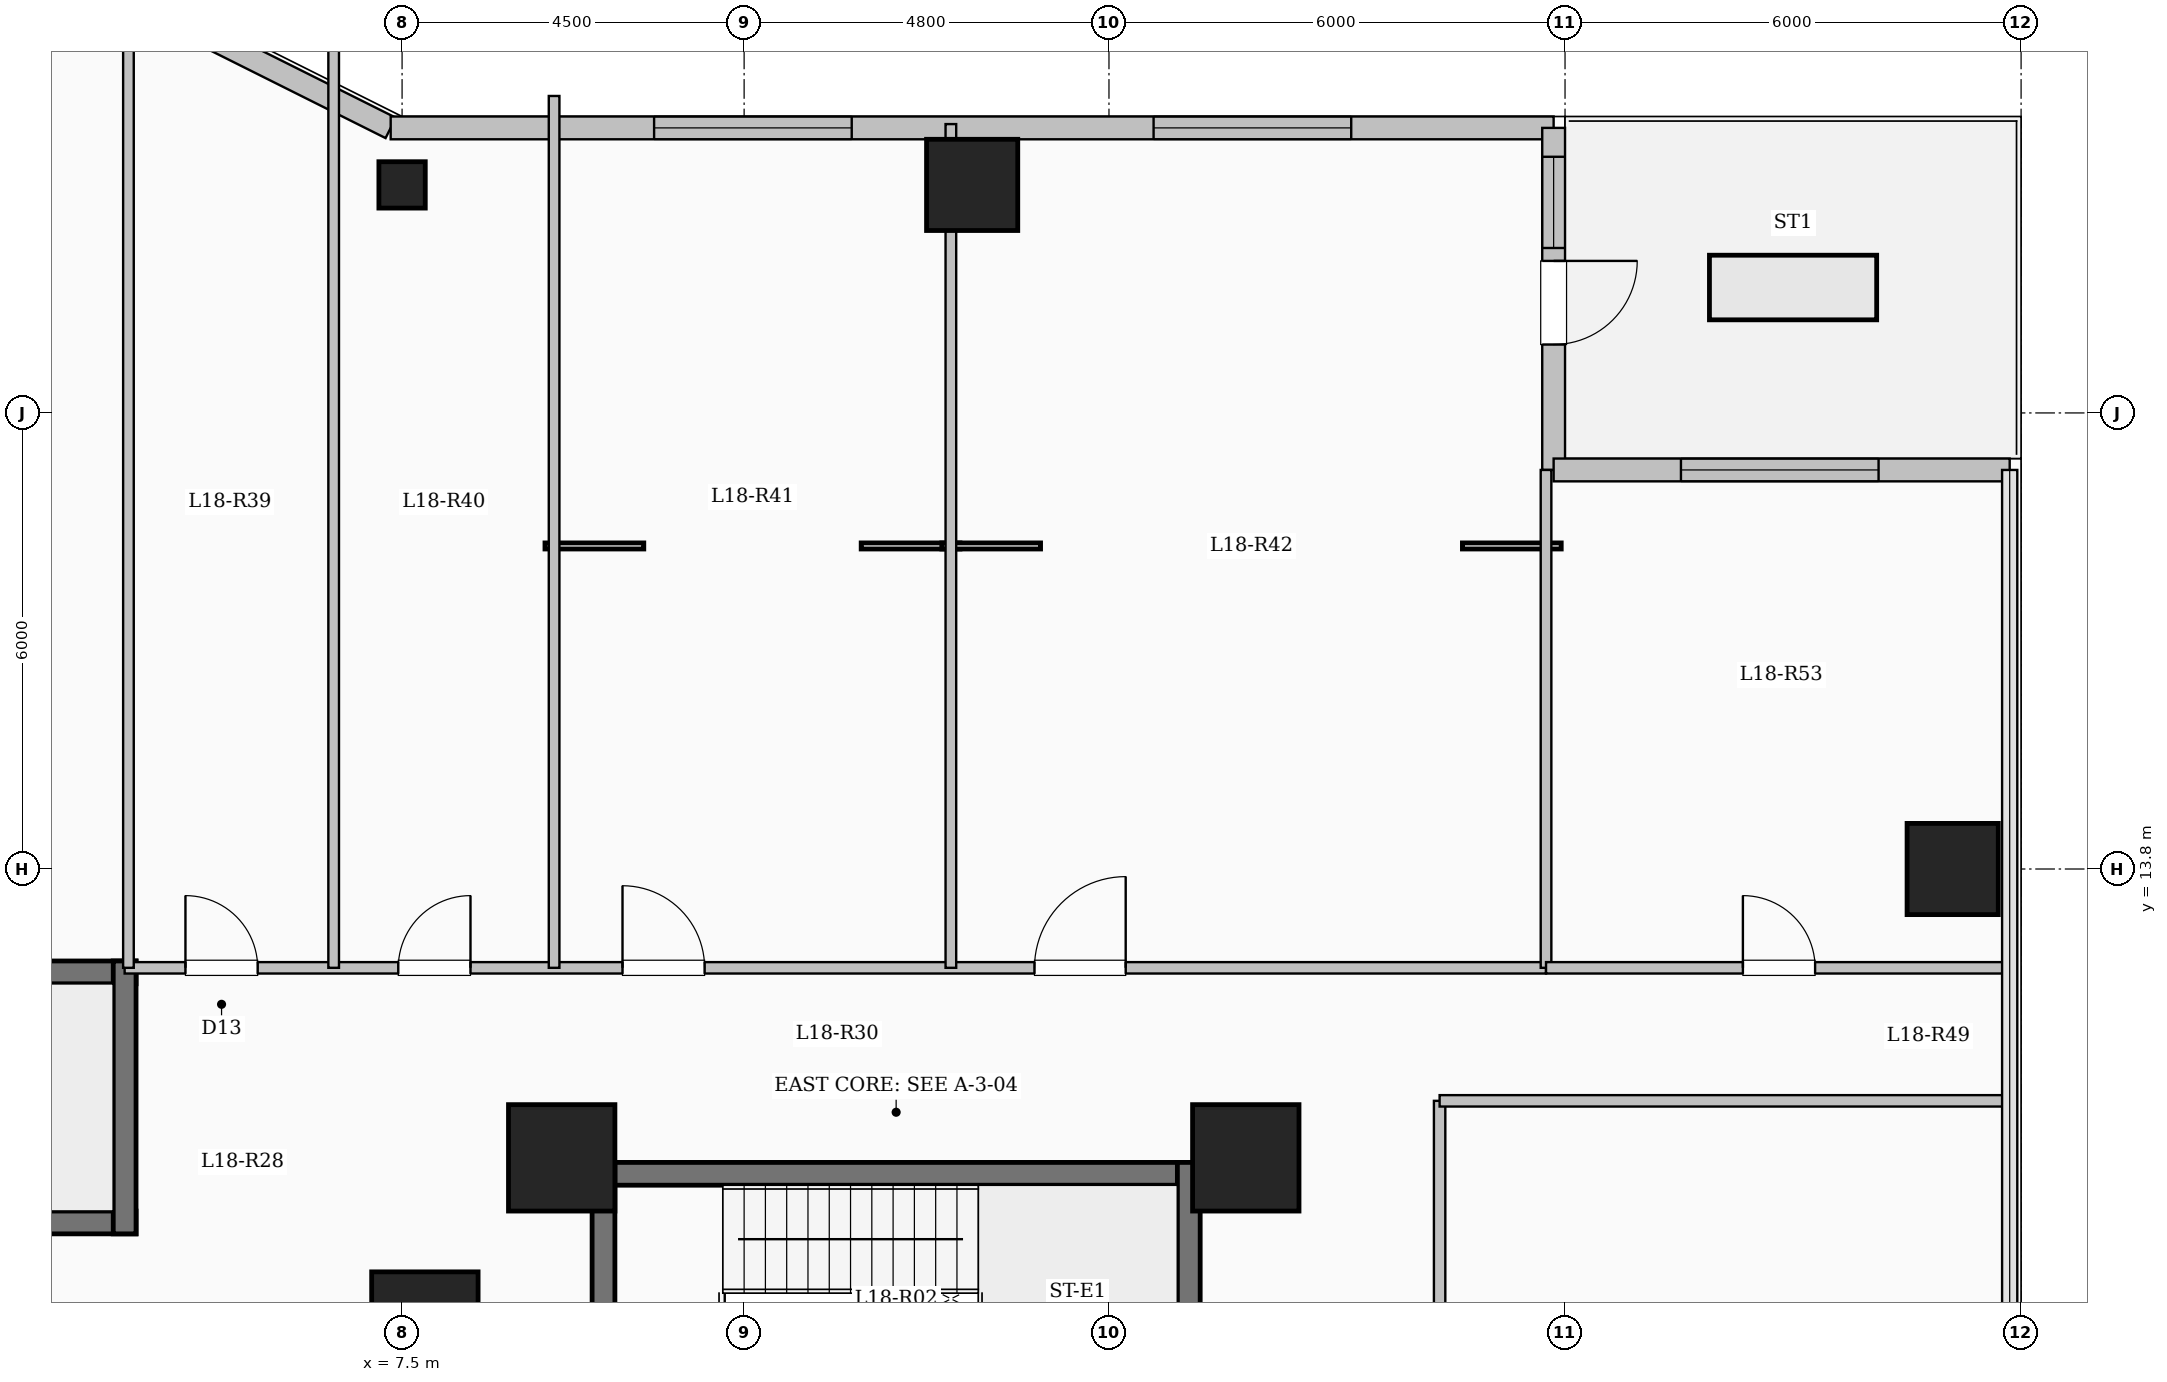
"""IFC4 building model, lengths in metres.
Left out: names, types, materials, properties, quantities, classifications, styles, units other than length and angle.
Written with IfcOpenShell. Run it as: python <this file> out.ifc"""

import sys

from ifc_helpers import new_model, si_unit, direction, frame, frame_2d, origin, origin_2d, place, context, subcontext, project, spatial, rectangle, hollow_circle, extrude, element, fill, save


model = new_model("IFC4")
c1 = context("Model", 3, precision=1e-05, world=origin(), true_north=direction((0.0, 1.0)))
c2 = subcontext(c1, "Body", "Model", "MODEL_VIEW")
j1 = project(units=[si_unit("LENGTHUNIT", "METRE"), si_unit("PLANEANGLEUNIT", "RADIAN")], contexts=[c1])
p1 = place(None, origin())
s1 = spatial("IfcSite", under=j1, at=p1, CompositionType="ELEMENT")
p2 = place(p1, origin())
s2 = spatial("IfcBuilding", under=s1, at=p2, CompositionType="ELEMENT")
p3 = place(p2, frame((0.0, 0.0, 68.7)))
s3 = spatial("IfcBuildingStorey", under=s2, at=p3, CompositionType="ELEMENT", Elevation=68.7)
for number, where, z_axis, x_axis in (
    (1, (7.8, 7.8, 0.0), (0.0, 0.0, 1.0), (1.0, 0.0, 0.0)),
    (2, (9.6, 10.0, 0.0), (0.0, 0.0, 1.0), (1.0, 0.0, 0.0)),
    (3, (18.6, 10.0, 0.0), (0.0, 0.0, 1.0), (1.0, 0.0, 0.0)),
):
    element("IfcColumn", number, at=place(p3, frame(where, z_axis=z_axis, x_axis=x_axis)), inside=s3, PredefinedType="COLUMN", context=c2, shape_type="SweptSolid", body=[
        extrude(rectangle(XDim=1.4, YDim=1.4, at=origin_2d()), origin(), (0.0, 0.0, 1.0), 4.5),
    ])
p4 = place(p3, frame((7.5, 22.8, 0.0), z_axis=(0.0, 0.0, 1.0), x_axis=(1.0, 0.0, 0.0)))
e4 = element("IfcColumn", 4, at=p4, inside=s3, PredefinedType="COLUMN", context=c2, shape_type="SweptSolid", body=[
    extrude(hollow_circle(Radius=0.305, WallThickness=0.025, at=origin_2d()), origin(), (0.0, 0.0, 1.0), 4.5),
])
for number, where, z_axis, x_axis in (
    (5, (15.0, 22.8, 0.0), (0.0, 0.0, 1.0), (1.0, 0.0, 0.0)),
    (6, (27.9, 13.8, 0.0), (0.0, 0.0, 1.0), (1.0, 0.0, 0.0)),
):
    element("IfcColumn", number, at=place(p3, frame(where, z_axis=z_axis, x_axis=x_axis)), inside=s3, PredefinedType="COLUMN", context=c2, shape_type="SweptSolid", body=[
        extrude(rectangle(XDim=1.2, YDim=1.2, at=origin_2d()), origin(), (0.0, 0.0, 1.0), 4.5),
    ])
p5 = place(p3, frame((4.35, 25.05, 0.0), z_axis=(0.0, 0.0, 1.0), x_axis=(0.894427191, -0.4472135955, 0.0)))
e7 = element("IfcWall", 7, at=p5, inside=s3, PredefinedType="SOLIDWALL", context=c2, shape_type="SweptSolid", body=[
    extrude(rectangle(XDim=3.354, YDim=0.3, at=frame_2d((1.677, 0.0))), origin(), (0.0, 0.0, 1.0), 4.2),
])
p6 = place(p3, frame((7.35, 23.55, 0.0), z_axis=(0.0, 0.0, 1.0), x_axis=(1.0, 0.0, 0.0)))
e8 = element("IfcWall", 8, at=p6, inside=s3, PredefinedType="SOLIDWALL", context=c2, shape_type="SweptSolid", body=[
    extrude(rectangle(XDim=15.3, YDim=0.3, at=frame_2d((7.65, 0.0))), origin(), (0.0, 0.0, 1.0), 4.2),
])
p7 = place(p6, frame((3.466, 0.0, 0.85)))
e9 = element("IfcOpeningElement", 9, at=p7, cuts=e8, PredefinedType="OPENING", context=c2, shape_type="SweptSolid", body=[
    extrude(rectangle(XDim=2.6, YDim=2.4, at=frame_2d((1.3, 1.2))), frame((0.0, 0.16, 0.0), z_axis=(0.0, -1.0, 0.0), x_axis=(1.0, 0.0, 0.0)), (0.0, 0.0, 1.0), 0.32),
])
p8 = place(p6, frame((10.037, 0.0, 0.85)))
e10 = element("IfcOpeningElement", 10, at=p8, cuts=e8, PredefinedType="OPENING", context=c2, shape_type="SweptSolid", body=[
    extrude(rectangle(XDim=2.6, YDim=2.4, at=frame_2d((1.3, 1.2))), frame((0.0, 0.16, 0.0), z_axis=(0.0, -1.0, 0.0), x_axis=(1.0, 0.0, 0.0)), (0.0, 0.0, 1.0), 0.32),
])
p9 = place(p3, frame((22.65, 23.55, 0.0), z_axis=(0.0, 0.0, 1.0), x_axis=(0.0, -1.0, 0.0)))
e11 = element("IfcWall", 11, at=p9, inside=s3, PredefinedType="SOLIDWALL", context=c2, shape_type="SweptSolid", body=[
    extrude(rectangle(XDim=4.5, YDim=0.3, at=frame_2d((2.25, 0.0))), origin(), (0.0, 0.0, 1.0), 4.2),
])
p10 = place(p9, frame((1.75, 0.0, 0.0)))
e12 = element("IfcOpeningElement", 12, at=p10, cuts=e11, PredefinedType="OPENING", context=c2, shape_type="SweptSolid", body=[
    extrude(rectangle(XDim=1.1, YDim=2.2, at=frame_2d((0.55, 1.1))), frame((0.0, 0.16, 0.0), z_axis=(0.0, -1.0, 0.0), x_axis=(1.0, 0.0, 0.0)), (0.0, 0.0, 1.0), 0.32),
])
p11 = place(p9, frame((0.38, 0.0, 0.95)))
e13 = element("IfcOpeningElement", 13, at=p11, cuts=e11, PredefinedType="OPENING", context=c2, shape_type="SweptSolid", body=[
    extrude(rectangle(XDim=1.2, YDim=1.5, at=frame_2d((0.6, 0.75))), frame((0.0, 0.16, 0.0), z_axis=(0.0, -1.0, 0.0), x_axis=(1.0, 0.0, 0.0)), (0.0, 0.0, 1.0), 0.32),
])
p12 = place(p3, frame((22.65, 19.05, 0.0), z_axis=(0.0, 0.0, 1.0), x_axis=(1.0, 0.0, 0.0)))
e14 = element("IfcWall", 14, at=p12, inside=s3, PredefinedType="SOLIDWALL", context=c2, shape_type="SweptSolid", body=[
    extrude(rectangle(XDim=6.0, YDim=0.3, at=frame_2d((3.0, 0.0))), origin(), (0.0, 0.0, 1.0), 4.2),
])
p13 = place(p12, frame((1.675, 0.0, 0.85)))
e15 = element("IfcOpeningElement", 15, at=p13, cuts=e14, PredefinedType="OPENING", context=c2, shape_type="SweptSolid", body=[
    extrude(rectangle(XDim=2.6, YDim=2.4, at=frame_2d((1.3, 1.2))), frame((0.0, 0.16, 0.0), z_axis=(0.0, -1.0, 0.0), x_axis=(1.0, 0.0, 0.0)), (0.0, 0.0, 1.0), 0.32),
])
p14 = place(p3, frame((10.0, 9.79, 0.0), z_axis=(0.0, 0.0, 1.0), x_axis=(1.0, 0.0, 0.0)))
e16 = element("IfcWall", 16, at=p14, inside=s3, PredefinedType="SHEAR", context=c2, shape_type="SweptSolid", body=[
    extrude(rectangle(XDim=8.0, YDim=0.3, at=frame_2d((4.0, 0.0))), origin(), (0.0, 0.0, 1.0), 4.5),
])
for number, where, z_axis, x_axis in (
    (17, (10.15, 6.35, 0.0), (0.0, 0.0, 1.0), (0.0, 1.0, 0.0)),
    (18, (17.85, 6.35, 0.0), (0.0, 0.0, 1.0), (0.0, 1.0, 0.0)),
):
    element("IfcWall", number, at=place(p3, frame(where, z_axis=z_axis, x_axis=x_axis)), inside=s3, PredefinedType="SHEAR", context=c2, shape_type="SweptSolid", body=[
        extrude(rectangle(XDim=3.59, YDim=0.3, at=frame_2d((1.795, 0.0))), origin(), (0.0, 0.0, 1.0), 4.5),
    ])
p15 = place(p3, frame((-4.0, 12.44, 0.0), z_axis=(0.0, 0.0, 1.0), x_axis=(1.0, 0.0, 0.0)))
e19 = element("IfcWall", 19, at=p15, inside=s3, PredefinedType="SHEAR", context=c2, shape_type="SweptSolid", body=[
    extrude(rectangle(XDim=8.0, YDim=0.3, at=frame_2d((4.0, 0.0))), origin(), (0.0, 0.0, 1.0), 4.5),
])
p16 = place(p3, frame((-4.0, 9.15, 0.0), z_axis=(0.0, 0.0, 1.0), x_axis=(1.0, 0.0, 0.0)))
e20 = element("IfcWall", 20, at=p16, inside=s3, PredefinedType="SHEAR", context=c2, shape_type="SweptSolid", body=[
    extrude(rectangle(XDim=8.0, YDim=0.3, at=frame_2d((4.0, 0.0))), origin(), (0.0, 0.0, 1.0), 4.5),
])
p17 = place(p16, frame((0.55, 0.0, 0.0)))
e21 = element("IfcOpeningElement", 21, at=p17, cuts=e20, PredefinedType="OPENING", context=c2, shape_type="SweptSolid", body=[
    extrude(rectangle(XDim=1.0, YDim=2.15, at=frame_2d((0.5, 1.075))), frame((0.0, 0.16, 0.0), z_axis=(0.0, -1.0, 0.0), x_axis=(1.0, 0.0, 0.0)), (0.0, 0.0, 1.0), 0.32),
])
p18 = place(p3, frame((3.85, 9.0, 0.0), z_axis=(0.0, 0.0, 1.0), x_axis=(0.0, 1.0, 0.0)))
e22 = element("IfcWall", 22, at=p18, inside=s3, PredefinedType="SHEAR", context=c2, shape_type="SweptSolid", body=[
    extrude(rectangle(XDim=3.59, YDim=0.3, at=frame_2d((1.795, 0.0))), origin(), (0.0, 0.0, 1.0), 4.5),
])
p19 = place(p3, frame((3.85, 12.5, 0.0), z_axis=(0.0, 0.0, 1.0), x_axis=(1.0, 0.0, 0.0)))
e23 = element("IfcWall", 23, at=p19, inside=s3, PredefinedType="PARTITIONING", context=c2, shape_type="SweptSolid", body=[
    extrude(rectangle(XDim=18.7, YDim=0.15, at=frame_2d((9.35, 0.0))), origin(), (0.0, 0.0, 1.0), 4.2),
])
p20 = place(p19, frame((0.8, 0.0, 0.0)))
e24 = element("IfcOpeningElement", 24, at=p20, cuts=e23, PredefinedType="OPENING", context=c2, shape_type="SweptSolid", body=[
    extrude(rectangle(XDim=0.95, YDim=2.15, at=frame_2d((0.475, 1.075))), frame((0.0, 0.085, 0.0), z_axis=(0.0, -1.0, 0.0), x_axis=(1.0, 0.0, 0.0)), (0.0, 0.0, 1.0), 0.17),
])
p21 = place(p19, frame((3.6, 0.0, 0.0)))
e25 = element("IfcOpeningElement", 25, at=p21, cuts=e23, PredefinedType="OPENING", context=c2, shape_type="SweptSolid", body=[
    extrude(rectangle(XDim=0.95, YDim=2.15, at=frame_2d((0.475, 1.075))), frame((0.0, 0.085, 0.0), z_axis=(0.0, -1.0, 0.0), x_axis=(1.0, 0.0, 0.0)), (0.0, 0.0, 1.0), 0.17),
])
p22 = place(p19, frame((6.55, 0.0, 0.0)))
e26 = element("IfcOpeningElement", 26, at=p22, cuts=e23, PredefinedType="OPENING", context=c2, shape_type="SweptSolid", body=[
    extrude(rectangle(XDim=1.08, YDim=2.15, at=frame_2d((0.54, 1.075))), frame((0.0, 0.085, 0.0), z_axis=(0.0, -1.0, 0.0), x_axis=(1.0, 0.0, 0.0)), (0.0, 0.0, 1.0), 0.17),
])
p23 = place(p19, frame((11.97, 0.0, 0.0)))
e27 = element("IfcOpeningElement", 27, at=p23, cuts=e23, PredefinedType="OPENING", context=c2, shape_type="SweptSolid", body=[
    extrude(rectangle(XDim=1.2, YDim=2.15, at=frame_2d((0.6, 1.075))), frame((0.0, 0.085, 0.0), z_axis=(0.0, -1.0, 0.0), x_axis=(1.0, 0.0, 0.0)), (0.0, 0.0, 1.0), 0.17),
])
p24 = place(p3, frame((21.15, -7.25, 0.0), z_axis=(0.0, 0.0, 1.0), x_axis=(0.0, 1.0, 0.0)))
e28 = element("IfcWall", 28, at=p24, inside=s3, PredefinedType="PARTITIONING", context=c2, shape_type="SweptSolid", body=[
    extrude(rectangle(XDim=18.0, YDim=0.15, at=frame_2d((9.0, 0.0))), origin(), (0.0, 0.0, 1.0), 3.635),
])
p25 = place(p3, frame((3.9, 12.5, 0.0), z_axis=(0.0, 0.0, 1.0), x_axis=(0.0, 1.0, 0.0)))
e29 = element("IfcWall", 29, at=p25, inside=s3, PredefinedType="PARTITIONING", context=c2, shape_type="SweptSolid", body=[
    extrude(rectangle(XDim=12.58, YDim=0.14, at=frame_2d((6.29, 0.0))), origin(), (0.0, 0.0, 1.0), 4.2),
])
p26 = place(p3, frame((6.6, 12.5, 0.0), z_axis=(0.0, 0.0, 1.0), x_axis=(0.0, 1.0, 0.0)))
e30 = element("IfcWall", 30, at=p26, inside=s3, PredefinedType="PARTITIONING", context=c2, shape_type="SweptSolid", body=[
    extrude(rectangle(XDim=12.185, YDim=0.14, at=frame_2d((6.093, 0.0))), origin(), (0.0, 0.0, 1.0), 4.2),
])
p27 = place(p3, frame((9.5, 12.5, 0.0), z_axis=(0.0, 0.0, 1.0), x_axis=(0.0, 1.0, 0.0)))
e31 = element("IfcWall", 31, at=p27, inside=s3, PredefinedType="PARTITIONING", context=c2, shape_type="SweptSolid", body=[
    extrude(rectangle(XDim=11.47, YDim=0.14, at=frame_2d((5.735, 0.0))), origin(), (0.0, 0.0, 1.0), 4.2),
])
p28 = place(p3, frame((14.72, 12.5, 0.0), z_axis=(0.0, 0.0, 1.0), x_axis=(0.0, 1.0, 0.0)))
e32 = element("IfcWall", 32, at=p28, inside=s3, PredefinedType="PARTITIONING", context=c2, shape_type="SweptSolid", body=[
    extrude(rectangle(XDim=11.1, YDim=0.14, at=frame_2d((5.55, 0.0))), origin(), (0.0, 0.0, 1.0), 3.535),
])
p29 = place(p3, frame((21.15, 10.75, 0.0), z_axis=(0.0, 0.0, 1.0), x_axis=(1.0, 0.0, 0.0)))
e33 = element("IfcWall", 33, at=p29, inside=s3, PredefinedType="PARTITIONING", context=c2, shape_type="SweptSolid", body=[
    extrude(rectangle(XDim=7.53, YDim=0.15, at=frame_2d((3.765, 0.0))), origin(), (0.0, 0.0, 1.0), 4.2),
])
p30 = place(p3, frame((22.55, 12.5, 0.0), z_axis=(0.0, 0.0, 1.0), x_axis=(0.0, 1.0, 0.0)))
e34 = element("IfcWall", 34, at=p30, inside=s3, PredefinedType="PARTITIONING", context=c2, shape_type="SweptSolid", body=[
    extrude(rectangle(XDim=6.55, YDim=0.14, at=frame_2d((3.275, 0.0))), origin(), (0.0, 0.0, 1.0), 4.2),
])
p31 = place(p3, frame((22.55, 12.5, 0.0), z_axis=(0.0, 0.0, 1.0), x_axis=(1.0, 0.0, 0.0)))
e35 = element("IfcWall", 35, at=p31, inside=s3, PredefinedType="PARTITIONING", context=c2, shape_type="SweptSolid", body=[
    extrude(rectangle(XDim=6.13, YDim=0.15, at=frame_2d((3.065, 0.0))), origin(), (0.0, 0.0, 1.0), 4.2),
])
p32 = place(p31, frame((2.59, 0.0, 0.0)))
e36 = element("IfcOpeningElement", 36, at=p32, cuts=e35, PredefinedType="OPENING", context=c2, shape_type="SweptSolid", body=[
    extrude(rectangle(XDim=0.95, YDim=2.15, at=frame_2d((0.475, 1.075))), frame((0.0, 0.085, 0.0), z_axis=(0.0, -1.0, 0.0), x_axis=(1.0, 0.0, 0.0)), (0.0, 0.0, 1.0), 0.17),
])
p33 = place(p7, origin())
e37 = element("IfcWindow", 37, at=p33, inside=s3, PartitioningType="SINGLE_PANEL", PredefinedType="WINDOW", context=c2, shape_type="SweptSolid", body=[
    extrude(rectangle(XDim=2.6, YDim=2.4, at=frame_2d((1.3, 1.2))), frame((0.0, 0.03, 0.0), z_axis=(0.0, -1.0, 0.0), x_axis=(1.0, 0.0, 0.0)), (0.0, 0.0, 1.0), 0.06),
])
fill(e9, e37)
p34 = place(p8, origin())
e38 = element("IfcWindow", 38, at=p34, inside=s3, PartitioningType="SINGLE_PANEL", PredefinedType="WINDOW", context=c2, shape_type="SweptSolid", body=[
    extrude(rectangle(XDim=2.6, YDim=2.4, at=frame_2d((1.3, 1.2))), frame((0.0, 0.03, 0.0), z_axis=(0.0, -1.0, 0.0), x_axis=(1.0, 0.0, 0.0)), (0.0, 0.0, 1.0), 0.06),
])
fill(e10, e38)
p35 = place(p10, origin())
e39 = element("IfcDoor", 39, at=p35, inside=s3, OperationType="SINGLE_SWING_LEFT", PredefinedType="DOOR", context=c2, shape_type="SweptSolid", body=[
    extrude(rectangle(XDim=1.1, YDim=2.2, at=frame_2d((0.55, 1.1))), frame((0.0, 0.025, 0.0), z_axis=(0.0, -1.0, 0.0), x_axis=(1.0, 0.0, 0.0)), (0.0, 0.0, 1.0), 0.05),
])
fill(e12, e39)
p36 = place(p11, origin())
e40 = element("IfcWindow", 40, at=p36, inside=s3, PartitioningType="SINGLE_PANEL", PredefinedType="WINDOW", context=c2, shape_type="SweptSolid", body=[
    extrude(rectangle(XDim=1.2, YDim=1.5, at=frame_2d((0.6, 0.75))), frame((0.0, 0.03, 0.0), z_axis=(0.0, -1.0, 0.0), x_axis=(1.0, 0.0, 0.0)), (0.0, 0.0, 1.0), 0.06),
])
fill(e13, e40)
p37 = place(p13, origin())
e41 = element("IfcWindow", 41, at=p37, inside=s3, PartitioningType="SINGLE_PANEL", PredefinedType="WINDOW", context=c2, shape_type="SweptSolid", body=[
    extrude(rectangle(XDim=2.6, YDim=2.4, at=frame_2d((1.3, 1.2))), frame((0.0, 0.03, 0.0), z_axis=(0.0, -1.0, 0.0), x_axis=(1.0, 0.0, 0.0)), (0.0, 0.0, 1.0), 0.06),
])
fill(e15, e41)
p38 = place(p20, origin())
e42 = element("IfcDoor", 42, at=p38, inside=s3, OperationType="SINGLE_SWING_LEFT", PredefinedType="DOOR", context=c2, shape_type="SweptSolid", body=[
    extrude(rectangle(XDim=0.95, YDim=2.15, at=frame_2d((0.475, 1.075))), frame((0.0, 0.025, 0.0), z_axis=(0.0, -1.0, 0.0), x_axis=(1.0, 0.0, 0.0)), (0.0, 0.0, 1.0), 0.05),
])
fill(e24, e42)
p39 = place(p21, origin())
e43 = element("IfcDoor", 43, at=p39, inside=s3, OperationType="SINGLE_SWING_RIGHT", PredefinedType="DOOR", context=c2, shape_type="SweptSolid", body=[
    extrude(rectangle(XDim=0.95, YDim=2.15, at=frame_2d((0.475, 1.075))), frame((0.0, 0.025, 0.0), z_axis=(0.0, -1.0, 0.0), x_axis=(1.0, 0.0, 0.0)), (0.0, 0.0, 1.0), 0.05),
])
fill(e25, e43)
p40 = place(p22, origin())
e44 = element("IfcDoor", 44, at=p40, inside=s3, OperationType="SINGLE_SWING_LEFT", PredefinedType="DOOR", context=c2, shape_type="SweptSolid", body=[
    extrude(rectangle(XDim=1.08, YDim=2.15, at=frame_2d((0.54, 1.075))), frame((0.0, 0.025, 0.0), z_axis=(0.0, -1.0, 0.0), x_axis=(1.0, 0.0, 0.0)), (0.0, 0.0, 1.0), 0.05),
])
fill(e26, e44)
p41 = place(p23, origin())
e45 = element("IfcDoor", 45, at=p41, inside=s3, OperationType="SINGLE_SWING_RIGHT", PredefinedType="DOOR", context=c2, shape_type="SweptSolid", body=[
    extrude(rectangle(XDim=1.2, YDim=2.15, at=frame_2d((0.6, 1.075))), frame((0.0, 0.025, 0.0), z_axis=(0.0, -1.0, 0.0), x_axis=(1.0, 0.0, 0.0)), (0.0, 0.0, 1.0), 0.05),
])
fill(e27, e45)
p42 = place(p32, origin())
e46 = element("IfcDoor", 46, at=p42, inside=s3, OperationType="SINGLE_SWING_LEFT", PredefinedType="DOOR", context=c2, shape_type="SweptSolid", body=[
    extrude(rectangle(XDim=0.95, YDim=2.15, at=frame_2d((0.475, 1.075))), frame((0.0, 0.025, 0.0), z_axis=(0.0, -1.0, 0.0), x_axis=(1.0, 0.0, 0.0)), (0.0, 0.0, 1.0), 0.05),
])
fill(e36, e46)
save(model, sys.argv[1])
